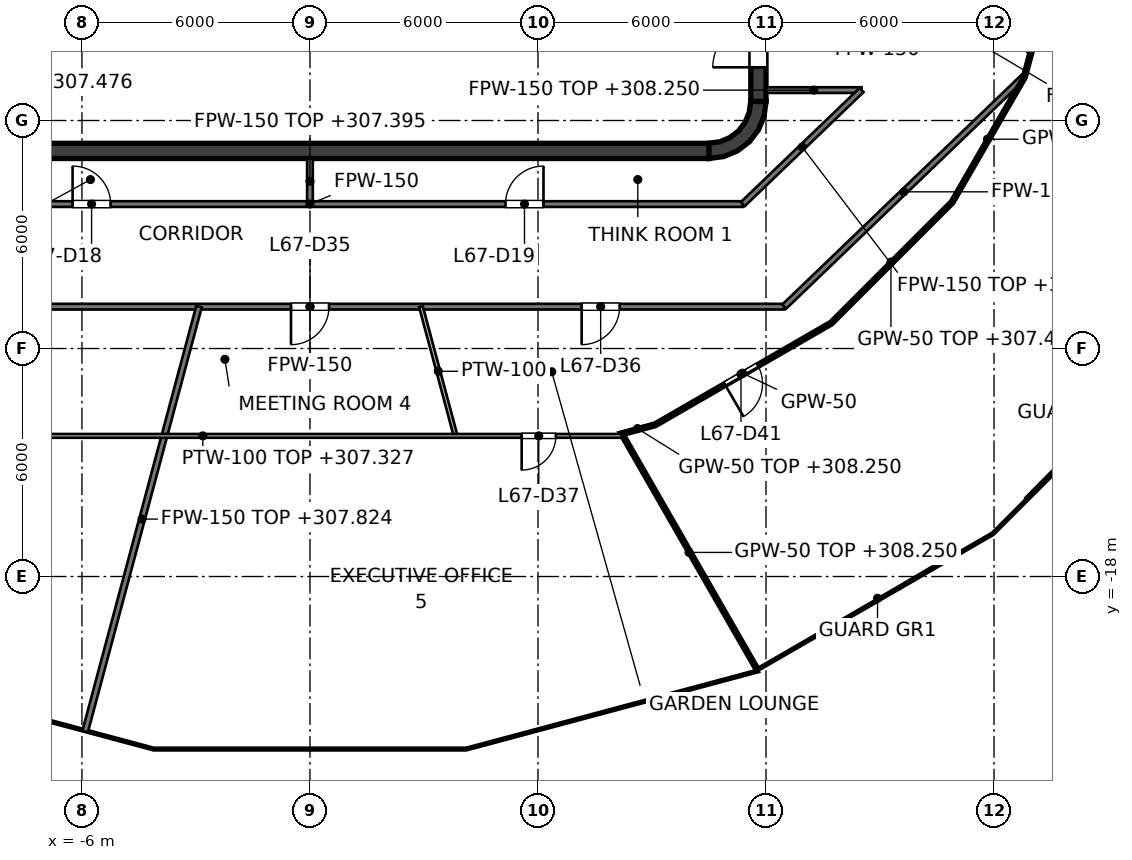
"""IFC4 building model, lengths in metres.
Left out: names, types, materials, properties, quantities, classifications, styles, units other than length and angle.
Written with IfcOpenShell. Run it as: python <this file> out.ifc"""

import sys

from ifc_helpers import new_model, si_unit, direction, frame, frame_2d, origin, place, context, subcontext, project, spatial, polyline, rectangle, outline, extrude, element, fill, save


model = new_model("IFC4")
c1 = context("Model", 3, precision=1e-05, world=origin(), true_north=direction((0.0, 1.0)))
c2 = subcontext(c1, "Body", "Model", "MODEL_VIEW")
j1 = project(units=[si_unit("LENGTHUNIT", "METRE"), si_unit("PLANEANGLEUNIT", "RADIAN")], contexts=[c1])
p1 = place(None, origin())
s1 = spatial("IfcSite", under=j1, at=p1, CompositionType="ELEMENT")
p2 = place(p1, origin())
s2 = spatial("IfcBuilding", under=s1, at=p2, CompositionType="ELEMENT")
p3 = place(p2, frame((0.0, 0.0, 304.4)))
s3 = spatial("IfcBuildingStorey", under=s2, at=p3, CompositionType="ELEMENT", Elevation=304.4)
p4 = place(p3, frame((-10.5, -6.8, 0.0), z_axis=(0.0, 0.0, 1.0), x_axis=(1.0, 0.0, 0.0)))
e1 = element("IfcWall", 1, at=p4, inside=s3, PredefinedType="SHEAR", context=c2, shape_type="SweptSolid", body=[
    extrude(rectangle(XDim=21.0, YDim=0.4, at=frame_2d((10.5, 0.0))), origin(), (0.0, 0.0, 1.0), 4.0),
])
p5 = place(p3, frame((11.8, -5.5, 0.0), z_axis=(0.0, 0.0, 1.0), x_axis=(0.0, 1.0, 0.0)))
e2 = element("IfcWall", 2, at=p5, inside=s3, PredefinedType="SHEAR", context=c2, shape_type="SweptSolid", body=[
    extrude(rectangle(XDim=11.0, YDim=0.4, at=frame_2d((5.5, 0.0))), origin(), (0.0, 0.0, 1.0), 4.0),
])
p6 = place(p5, frame((3.2, 0.0, 0.0)))
e3 = element("IfcOpeningElement", 3, at=p6, cuts=e2, PredefinedType="OPENING", context=c2, shape_type="SweptSolid", body=[
    extrude(rectangle(XDim=1.0, YDim=2.1, at=frame_2d((0.5, 1.05))), frame((0.0, 0.2, 0.0), z_axis=(0.0, -1.0, 0.0), x_axis=(1.0, 0.0, 0.0)), (0.0, 0.0, 1.0), 0.4),
])
p7 = place(p5, frame((6.1, 0.0, 0.0)))
e4 = element("IfcOpeningElement", 4, at=p7, cuts=e2, PredefinedType="OPENING", context=c2, shape_type="SweptSolid", body=[
    extrude(rectangle(XDim=1.0, YDim=2.1, at=frame_2d((0.5, 1.05))), frame((0.0, 0.2, 0.0), z_axis=(0.0, -1.0, 0.0), x_axis=(1.0, 0.0, 0.0)), (0.0, 0.0, 1.0), 0.4),
])
p8 = place(p5, frame((0.9, 0.0, 0.0)))
e5 = element("IfcOpeningElement", 5, at=p8, cuts=e2, PredefinedType="OPENING", context=c2, shape_type="SweptSolid", body=[
    extrude(rectangle(XDim=1.2, YDim=2.1, at=frame_2d((0.6, 1.05))), frame((0.0, 0.2, 0.0), z_axis=(0.0, -1.0, 0.0), x_axis=(1.0, 0.0, 0.0)), (0.0, 0.0, 1.0), 0.4),
])
p9 = place(p5, frame((8.9, 0.0, 0.0)))
e6 = element("IfcOpeningElement", 6, at=p9, cuts=e2, PredefinedType="OPENING", context=c2, shape_type="SweptSolid", body=[
    extrude(rectangle(XDim=1.2, YDim=2.1, at=frame_2d((0.6, 1.05))), frame((0.0, 0.2, 0.0), z_axis=(0.0, -1.0, 0.0), x_axis=(1.0, 0.0, 0.0)), (0.0, 0.0, 1.0), 0.4),
])
p10 = place(p3, origin())
e7 = element("IfcWall", 7, at=p10, inside=s3, PredefinedType="SHEAR", context=c2, shape_type="SweptSolid", body=[
    extrude(outline(polyline([(12.0, -5.5), (11.596, -5.5), (11.559, -5.784), (11.45, -6.048), (11.275, -6.275), (11.048, -6.45), (10.784, -6.559), (10.5, -6.596), (10.5, -7.0), (10.888, -6.949), (11.25, -6.799), (11.561, -6.561), (11.799, -6.25), (11.949, -5.888), (12.0, -5.5)])), origin(), (0.0, 0.0, 1.0), 4.0),
])
p11 = place(p3, frame((-1.2, -6.6, 0.0), z_axis=(0.0, 0.0, 1.0), x_axis=(0.0, 1.0, 0.0)))
e8 = element("IfcWall", 8, at=p11, inside=s3, PredefinedType="PARTITIONING", context=c2, shape_type="SweptSolid", body=[
    extrude(rectangle(XDim=2.5, YDim=0.15, at=frame_2d((1.25, 0.0))), origin(), (0.0, 0.0, 1.0), 3.85),
])
p12 = place(p11, frame((0.8, 0.0, 0.0)))
e9 = element("IfcOpeningElement", 9, at=p12, cuts=e8, PredefinedType="OPENING", context=c2, shape_type="SweptSolid", body=[
    extrude(rectangle(XDim=0.9, YDim=2.1, at=frame_2d((0.45, 1.05))), frame((0.0, 0.075, 0.0), z_axis=(0.0, -1.0, 0.0), x_axis=(1.0, 0.0, 0.0)), (0.0, 0.0, 1.0), 0.15),
])
p13 = place(p3, frame((9.0, -6.6, 0.0), z_axis=(0.0, 0.0, 1.0), x_axis=(0.0, 1.0, 0.0)))
e10 = element("IfcWall", 10, at=p13, inside=s3, PredefinedType="SOLIDWALL", context=c2, shape_type="SweptSolid", body=[
    extrude(rectangle(XDim=2.5, YDim=0.25, at=frame_2d((1.25, 0.0))), origin(), (0.0, 0.0, 1.0), 3.85),
])
p14 = place(p13, frame((0.65, 0.0, 0.0)))
e11 = element("IfcOpeningElement", 11, at=p14, cuts=e10, PredefinedType="OPENING", context=c2, shape_type="SweptSolid", body=[
    extrude(rectangle(XDim=1.2, YDim=2.1, at=frame_2d((0.6, 1.05))), frame((0.0, 0.125, 0.0), z_axis=(0.0, -1.0, 0.0), x_axis=(1.0, 0.0, 0.0)), (0.0, 0.0, 1.0), 0.25),
])
p15 = place(p3, frame((3.15, -6.6, 0.0), z_axis=(0.0, 0.0, 1.0), x_axis=(0.0, 1.0, 0.0)))
e12 = element("IfcWall", 12, at=p15, inside=s3, PredefinedType="SOLIDWALL", context=c2, shape_type="SweptSolid", body=[
    extrude(rectangle(XDim=2.5, YDim=0.25, at=frame_2d((1.25, 0.0))), origin(), (0.0, 0.0, 1.0), 3.85),
])
p16 = place(p3, frame((-2.9, -6.6, 0.0), z_axis=(0.0, 0.0, 1.0), x_axis=(0.0, 1.0, 0.0)))
e13 = element("IfcWall", 13, at=p16, inside=s3, PredefinedType="PARTITIONING", context=c2, shape_type="SweptSolid", body=[
    extrude(rectangle(XDim=2.5, YDim=0.25, at=frame_2d((1.25, 0.0))), origin(), (0.0, 0.0, 1.0), 3.85),
])
p17 = place(p16, frame((0.8, 0.0, 0.0)))
e14 = element("IfcOpeningElement", 14, at=p17, cuts=e13, PredefinedType="OPENING", context=c2, shape_type="SweptSolid", body=[
    extrude(rectangle(XDim=0.9, YDim=2.1, at=frame_2d((0.45, 1.05))), frame((0.0, 0.125, 0.0), z_axis=(0.0, -1.0, 0.0), x_axis=(1.0, 0.0, 0.0)), (0.0, 0.0, 1.0), 0.25),
])
p18 = place(p3, frame((-12.478, -10.899, 0.0), z_axis=(0.0, 0.0, 1.0), x_axis=(1.0, 0.0, 0.0)))
e15 = element("IfcWall", 15, at=p18, inside=s3, PredefinedType="PARTITIONING", context=c2, shape_type="SweptSolid", body=[
    extrude(rectangle(XDim=24.956, YDim=0.15, at=frame_2d((12.478, 0.0))), origin(), (0.0, 0.0, 1.0), 2.927),
])
p19 = place(p18, frame((4.229, 0.0, 0.0)))
e16 = element("IfcOpeningElement", 16, at=p19, cuts=e15, PredefinedType="OPENING", context=c2, shape_type="SweptSolid", body=[
    extrude(rectangle(XDim=1.0, YDim=2.1, at=frame_2d((0.5, 1.05))), frame((0.0, 0.075, 0.0), z_axis=(0.0, -1.0, 0.0), x_axis=(1.0, 0.0, 0.0)), (0.0, 0.0, 1.0), 0.15),
])
p20 = place(p18, frame((11.979, 0.0, 0.0)))
e17 = element("IfcOpeningElement", 17, at=p20, cuts=e15, PredefinedType="OPENING", context=c2, shape_type="SweptSolid", body=[
    extrude(rectangle(XDim=1.0, YDim=2.1, at=frame_2d((0.5, 1.05))), frame((0.0, 0.075, 0.0), z_axis=(0.0, -1.0, 0.0), x_axis=(1.0, 0.0, 0.0)), (0.0, 0.0, 1.0), 0.15),
])
p21 = place(p18, frame((19.627, 0.0, 0.0)))
e18 = element("IfcOpeningElement", 18, at=p21, cuts=e15, PredefinedType="OPENING", context=c2, shape_type="SweptSolid", body=[
    extrude(rectangle(XDim=1.0, YDim=2.1, at=frame_2d((0.5, 1.05))), frame((0.0, 0.075, 0.0), z_axis=(0.0, -1.0, 0.0), x_axis=(1.0, 0.0, 0.0)), (0.0, 0.0, 1.0), 0.15),
])
p22 = place(p3, frame((-11.391, -8.199, 0.0), z_axis=(0.0, 0.0, 1.0), x_axis=(1.0, 0.0, 0.0)))
e19 = element("IfcWall", 19, at=p22, inside=s3, PredefinedType="PARTITIONING", context=c2, shape_type="SweptSolid", body=[
    extrude(rectangle(XDim=22.782, YDim=0.15, at=frame_2d((11.391, 0.0))), origin(), (0.0, 0.0, 1.0), 2.927),
])
p23 = place(p22, frame((5.145, 0.0, 0.0)))
e20 = element("IfcOpeningElement", 20, at=p23, cuts=e19, PredefinedType="OPENING", context=c2, shape_type="SweptSolid", body=[
    extrude(rectangle(XDim=1.0, YDim=2.1, at=frame_2d((0.5, 1.05))), frame((0.0, 0.075, 0.0), z_axis=(0.0, -1.0, 0.0), x_axis=(1.0, 0.0, 0.0)), (0.0, 0.0, 1.0), 0.15),
])
p24 = place(p22, frame((16.536, 0.0, 0.0)))
e21 = element("IfcOpeningElement", 21, at=p24, cuts=e19, PredefinedType="OPENING", context=c2, shape_type="SweptSolid", body=[
    extrude(rectangle(XDim=1.0, YDim=2.1, at=frame_2d((0.5, 1.05))), frame((0.0, 0.075, 0.0), z_axis=(0.0, -1.0, 0.0), x_axis=(1.0, 0.0, 0.0)), (0.0, 0.0, 1.0), 0.15),
])
p25 = place(p3, frame((12.0, -5.2, 0.0), z_axis=(0.0, 0.0, 1.0), x_axis=(1.0, 0.0, 0.0)))
e22 = element("IfcWall", 22, at=p25, inside=s3, PredefinedType="PARTITIONING", context=c2, shape_type="SweptSolid", body=[
    extrude(rectangle(XDim=2.514, YDim=0.15, at=frame_2d((1.257, 0.0))), origin(), (0.0, 0.0, 1.0), 3.85),
])
p26 = place(p3, frame((12.478, -10.899, 0.0), z_axis=(0.0, 0.0, 1.0), x_axis=(0.721258165391, 0.692666340208, 0.0)))
e23 = element("IfcWall", 23, at=p26, inside=s3, PredefinedType="PARTITIONING", context=c2, shape_type="SweptSolid", body=[
    extrude(rectangle(XDim=8.727, YDim=0.15, at=frame_2d((4.363, 0.0))), origin(), (0.0, 0.0, 1.0), 2.995),
])
p27 = place(p3, frame((11.391, -8.199, 0.0), z_axis=(0.0, 0.0, 1.0), x_axis=(0.721256597366, 0.692667972954, 0.0)))
e24 = element("IfcWall", 24, at=p27, inside=s3, PredefinedType="PARTITIONING", context=c2, shape_type="SweptSolid", body=[
    extrude(rectangle(XDim=4.33, YDim=0.15, at=frame_2d((2.165, 0.0))), origin(), (0.0, 0.0, 1.0), 3.076),
])
p28 = place(p3, frame((-5.916, -22.078, 0.0), z_axis=(0.0, 0.0, 1.0), x_axis=(0.258855937104, 0.965915940352, 0.0)))
e25 = element("IfcWall", 25, at=p28, inside=s3, PredefinedType="PARTITIONING", context=c2, shape_type="SweptSolid", body=[
    extrude(rectangle(XDim=11.573, YDim=0.15, at=frame_2d((5.787, 0.0))), origin(), (0.0, 0.0, 1.0), 3.424),
])
p29 = place(p3, frame((0.0, -8.199, 0.0), z_axis=(0.0, 0.0, 1.0), x_axis=(0.0, 1.0, 0.0)))
e26 = element("IfcWall", 26, at=p29, inside=s3, PredefinedType="PARTITIONING", context=c2, shape_type="SweptSolid", body=[
    extrude(rectangle(XDim=1.199, YDim=0.15, at=frame_2d((0.6, 0.0))), origin(), (0.0, 0.0, 1.0), 2.995),
])
p30 = place(p3, frame((8.168, -14.228, 0.0), z_axis=(0.0, 0.0, 1.0), x_axis=(0.49889922878, -0.866660002263, 0.0)))
e27 = element("IfcWall", 27, at=p30, inside=s3, PredefinedType="PARTITIONING", context=c2, shape_type="SweptSolid", body=[
    extrude(rectangle(XDim=7.242, YDim=0.05, at=frame_2d((3.621, 0.0))), origin(), (0.0, 0.0, 1.0), 3.85),
])
p31 = place(p3, frame((8.168, -14.228, 0.0), z_axis=(0.0, 0.0, 1.0), x_axis=(0.965935230581, 0.258783945257, 0.0)))
e28 = element("IfcWall", 28, at=p31, inside=s3, PredefinedType="PARTITIONING", context=c2, shape_type="SweptSolid", body=[
    extrude(rectangle(XDim=0.935, YDim=0.05, at=frame_2d((0.467, 0.0))), origin(), (0.0, 0.0, 1.0), 3.85),
])
p32 = place(p3, frame((9.071, -13.986, 0.0), z_axis=(0.0, 0.0, 1.0), x_axis=(0.866010600352, 0.50002563942, 0.0)))
e29 = element("IfcWall", 29, at=p32, inside=s3, PredefinedType="PARTITIONING", context=c2, shape_type="SweptSolid", body=[
    extrude(rectangle(XDim=5.344, YDim=0.05, at=frame_2d((2.672, 0.0))), origin(), (0.0, 0.0, 1.0), 2.995),
])
p33 = place(p32, frame((2.121, 0.0, 0.0)))
e30 = element("IfcOpeningElement", 30, at=p33, cuts=e29, PredefinedType="OPENING", context=c2, shape_type="SweptSolid", body=[
    extrude(rectangle(XDim=1.0, YDim=2.1, at=frame_2d((0.5, 1.05))), frame((0.0, 0.025, 0.0), z_axis=(0.0, -1.0, 0.0), x_axis=(1.0, 0.0, 0.0)), (0.0, 0.0, 1.0), 0.05),
])
p34 = place(p3, frame((13.699, -11.314, 0.0), z_axis=(0.0, 0.0, 1.0), x_axis=(0.707106781187, 0.707106781187, 0.0)))
e31 = element("IfcWall", 31, at=p34, inside=s3, PredefinedType="PARTITIONING", context=c2, shape_type="SweptSolid", body=[
    extrude(rectangle(XDim=4.494, YDim=0.05, at=frame_2d((2.247, 0.0))), origin(), (0.0, 0.0, 1.0), 3.076),
])
p35 = place(p3, frame((16.877, -8.136, 0.0), z_axis=(0.0, 0.0, 1.0), x_axis=(0.500054674034, 0.865993835415, 0.0)))
e32 = element("IfcWall", 32, at=p35, inside=s3, PredefinedType="PARTITIONING", context=c2, shape_type="SweptSolid", body=[
    extrude(rectangle(XDim=3.795, YDim=0.05, at=frame_2d((1.898, 0.0))), origin(), (0.0, 0.0, 1.0), 2.995),
])
p36 = place(p3, frame((18.775, -4.849, 0.0), z_axis=(0.0, 0.0, 1.0), x_axis=(0.258525957933, 0.966004311106, 0.0)))
e33 = element("IfcWall", 33, at=p36, inside=s3, PredefinedType="PARTITIONING", context=c2, shape_type="SweptSolid", body=[
    extrude(rectangle(XDim=3.097, YDim=0.05, at=frame_2d((1.549, 0.0))), origin(), (0.0, 0.0, 1.0), 2.927),
])
p37 = place(p3, frame((2.921, -10.899, 0.0), z_axis=(0.0, 0.0, 1.0), x_axis=(0.258836620112, -0.965921116908, 0.0)))
e34 = element("IfcWall", 34, at=p37, inside=s3, PredefinedType="PARTITIONING", context=c2, shape_type="SweptSolid", body=[
    extrude(rectangle(XDim=3.52, YDim=0.1, at=frame_2d((1.76, 0.0))), origin(), (0.0, 0.0, 1.0), 3.85),
])
p38 = place(p3, frame((-13.846, -14.299, 0.0), z_axis=(0.0, 0.0, 1.0), x_axis=(1.0, 0.0, 0.0)))
e35 = element("IfcWall", 35, at=p38, inside=s3, PredefinedType="PARTITIONING", context=c2, shape_type="SweptSolid", body=[
    extrude(rectangle(XDim=22.055, YDim=0.1, at=frame_2d((11.027, 0.0))), origin(), (0.0, 0.0, 1.0), 2.927),
])
p39 = place(p38, frame((4.107, 0.0, 0.0)))
e36 = element("IfcOpeningElement", 36, at=p39, cuts=e35, PredefinedType="OPENING", context=c2, shape_type="SweptSolid", body=[
    extrude(rectangle(XDim=1.8, YDim=2.1, at=frame_2d((0.9, 1.05))), frame((0.0, 0.05, 0.0), z_axis=(0.0, -1.0, 0.0), x_axis=(1.0, 0.0, 0.0)), (0.0, 0.0, 1.0), 0.1),
])
p40 = place(p38, frame((19.417, 0.0, 0.0)))
e37 = element("IfcOpeningElement", 37, at=p40, cuts=e35, PredefinedType="OPENING", context=c2, shape_type="SweptSolid", body=[
    extrude(rectangle(XDim=0.9, YDim=2.1, at=frame_2d((0.45, 1.05))), frame((0.0, 0.05, 0.0), z_axis=(0.0, -1.0, 0.0), x_axis=(1.0, 0.0, 0.0)), (0.0, 0.0, 1.0), 0.1),
])
p41 = place(p14, origin())
e38 = element("IfcDoor", 38, at=p41, inside=s3, OperationType="SINGLE_SWING_LEFT", PredefinedType="DOOR", context=c2, shape_type="SweptSolid", body=[
    extrude(rectangle(XDim=1.2, YDim=2.1, at=frame_2d((0.6, 1.05))), frame((0.0, 0.025, 0.0), z_axis=(0.0, -1.0, 0.0), x_axis=(1.0, 0.0, 0.0)), (0.0, 0.0, 1.0), 0.05),
])
fill(e11, e38)
p42 = place(p17, origin())
e39 = element("IfcDoor", 39, at=p42, inside=s3, OperationType="SINGLE_SWING_RIGHT", PredefinedType="DOOR", context=c2, shape_type="SweptSolid", body=[
    extrude(rectangle(XDim=0.9, YDim=2.1, at=frame_2d((0.45, 1.05))), frame((0.0, 0.025, 0.0), z_axis=(0.0, -1.0, 0.0), x_axis=(1.0, 0.0, 0.0)), (0.0, 0.0, 1.0), 0.05),
])
fill(e14, e39)
p43 = place(p12, origin())
e40 = element("IfcDoor", 40, at=p43, inside=s3, OperationType="SINGLE_SWING_RIGHT", PredefinedType="DOOR", context=c2, shape_type="SweptSolid", body=[
    extrude(rectangle(XDim=0.9, YDim=2.1, at=frame_2d((0.45, 1.05))), frame((0.0, 0.025, 0.0), z_axis=(0.0, -1.0, 0.0), x_axis=(1.0, 0.0, 0.0)), (0.0, 0.0, 1.0), 0.05),
])
fill(e9, e40)
p44 = place(p8, origin())
e41 = element("IfcDoor", 41, at=p44, inside=s3, OperationType="SINGLE_SWING_LEFT", PredefinedType="DOOR", context=c2, shape_type="SweptSolid", body=[
    extrude(rectangle(XDim=1.2, YDim=2.1, at=frame_2d((0.6, 1.05))), frame((0.0, 0.025, 0.0), z_axis=(0.0, -1.0, 0.0), x_axis=(1.0, 0.0, 0.0)), (0.0, 0.0, 1.0), 0.05),
])
fill(e5, e41)
p45 = place(p23, origin())
e42 = element("IfcDoor", 42, at=p45, inside=s3, OperationType="SINGLE_SWING_LEFT", PredefinedType="DOOR", context=c2, shape_type="SweptSolid", body=[
    extrude(rectangle(XDim=1.0, YDim=2.1, at=frame_2d((0.5, 1.05))), frame((0.0, 0.025, 0.0), z_axis=(0.0, -1.0, 0.0), x_axis=(1.0, 0.0, 0.0)), (0.0, 0.0, 1.0), 0.05),
])
fill(e20, e42)
p46 = place(p24, origin())
e43 = element("IfcDoor", 43, at=p46, inside=s3, OperationType="SINGLE_SWING_RIGHT", PredefinedType="DOOR", context=c2, shape_type="SweptSolid", body=[
    extrude(rectangle(XDim=1.0, YDim=2.1, at=frame_2d((0.5, 1.05))), frame((0.0, 0.025, 0.0), z_axis=(0.0, -1.0, 0.0), x_axis=(1.0, 0.0, 0.0)), (0.0, 0.0, 1.0), 0.05),
])
fill(e21, e43)
p47 = place(p20, origin())
e44 = element("IfcDoor", 44, at=p47, inside=s3, OperationType="SINGLE_SWING_LEFT", PredefinedType="DOOR", context=c2, shape_type="SweptSolid", body=[
    extrude(rectangle(XDim=1.0, YDim=2.1, at=frame_2d((0.5, 1.05))), frame((0.0, 0.025, 0.0), z_axis=(0.0, -1.0, 0.0), x_axis=(1.0, 0.0, 0.0)), (0.0, 0.0, 1.0), 0.05),
])
fill(e17, e44)
p48 = place(p21, origin())
e45 = element("IfcDoor", 45, at=p48, inside=s3, OperationType="SINGLE_SWING_LEFT", PredefinedType="DOOR", context=c2, shape_type="SweptSolid", body=[
    extrude(rectangle(XDim=1.0, YDim=2.1, at=frame_2d((0.5, 1.05))), frame((0.0, 0.025, 0.0), z_axis=(0.0, -1.0, 0.0), x_axis=(1.0, 0.0, 0.0)), (0.0, 0.0, 1.0), 0.05),
])
fill(e18, e45)
p49 = place(p40, origin())
e46 = element("IfcDoor", 46, at=p49, inside=s3, OperationType="SINGLE_SWING_LEFT", PredefinedType="DOOR", context=c2, shape_type="SweptSolid", body=[
    extrude(rectangle(XDim=0.9, YDim=2.1, at=frame_2d((0.45, 1.05))), frame((0.0, 0.025, 0.0), z_axis=(0.0, -1.0, 0.0), x_axis=(1.0, 0.0, 0.0)), (0.0, 0.0, 1.0), 0.05),
])
fill(e37, e46)
p50 = place(p33, origin())
e47 = element("IfcDoor", 47, at=p50, inside=s3, OperationType="SINGLE_SWING_LEFT", PredefinedType="DOOR", context=c2, shape_type="SweptSolid", body=[
    extrude(rectangle(XDim=1.0, YDim=2.1, at=frame_2d((0.5, 1.05))), frame((0.0, 0.025, 0.0), z_axis=(0.0, -1.0, 0.0), x_axis=(1.0, 0.0, 0.0)), (0.0, 0.0, 1.0), 0.05),
])
fill(e30, e47)
save(model, sys.argv[1])
